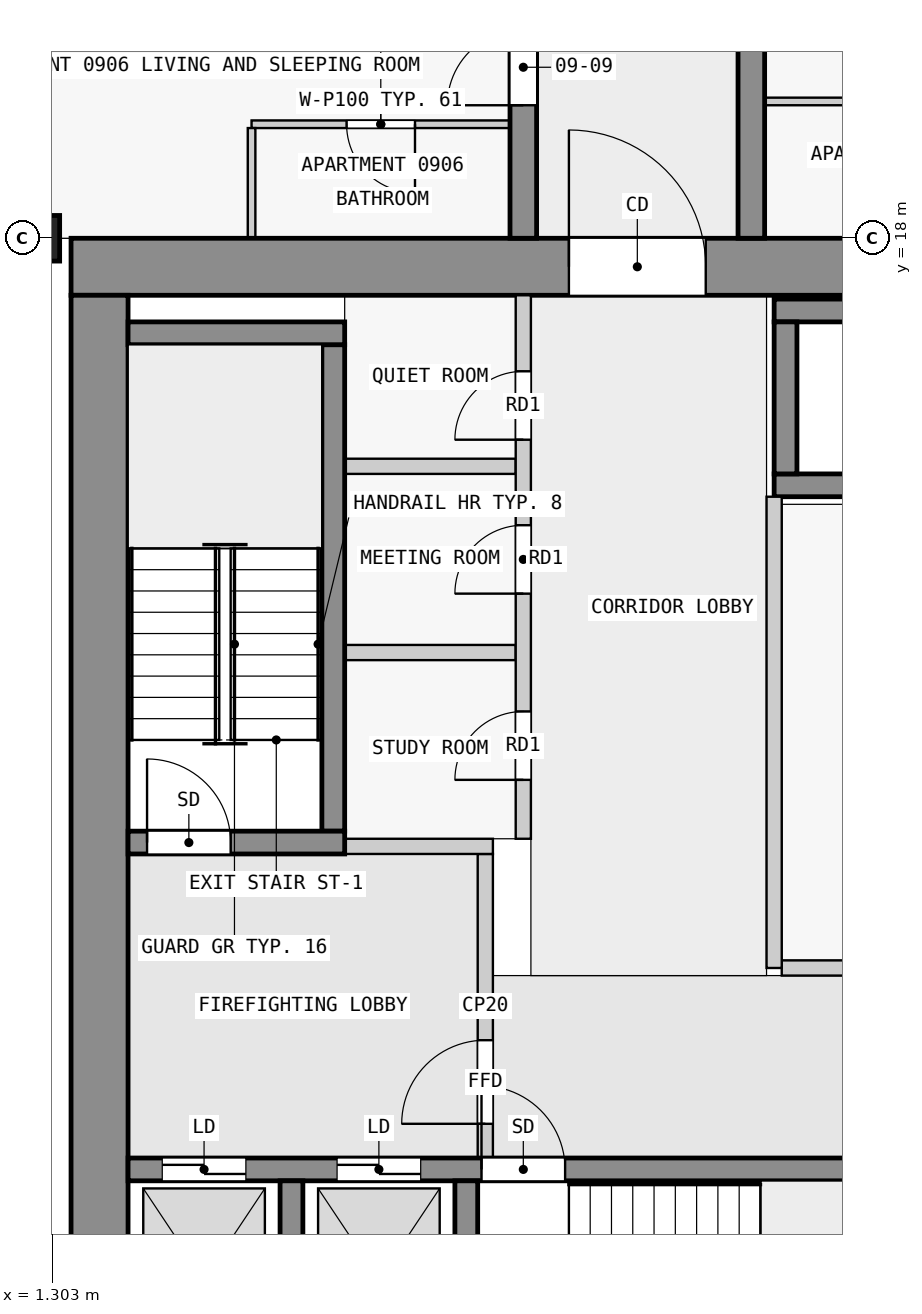
"""IFC4 building model, lengths in metres.
Left out: names, types, materials, properties, quantities, classifications, styles, units other than length and angle.
Written with IfcOpenShell. Run it as: python <this file> out.ifc"""

import sys

from ifc_helpers import new_model, si_unit, direction, frame, frame_2d, origin, origin_2d, place, context, subcontext, project, spatial, rectangle, extrude, element, fill, save


model = new_model("IFC4")
c1 = context("Model", 3, precision=1e-05, world=origin(), true_north=direction((0.0, 1.0)))
c2 = subcontext(c1, "Body", "Model", "MODEL_VIEW")
j1 = project(units=[si_unit("LENGTHUNIT", "METRE"), si_unit("PLANEANGLEUNIT", "RADIAN")], contexts=[c1])
p1 = place(None, origin())
s1 = spatial("IfcSite", under=j1, at=p1, CompositionType="ELEMENT")
p2 = place(p1, origin())
s2 = spatial("IfcBuilding", under=s1, at=p2, CompositionType="ELEMENT")
p3 = place(p2, frame((0.0, 0.0, 40.8)))
s3 = spatial("IfcBuildingStorey", under=s2, at=p3, CompositionType="ELEMENT", Elevation=40.8)
p4 = place(p3, frame((0.7, 18.0, 0.0), z_axis=(0.0, 0.0, 1.0), x_axis=(0.0, 1.0, 0.0)))
e1 = element("IfcColumn", 1, at=p4, inside=s3, PredefinedType="COLUMN", context=c2, shape_type="SweptSolid", body=[
    extrude(rectangle(XDim=0.6, YDim=1.4, at=origin_2d()), origin(), (0.0, 0.0, 1.0), 3.5),
])
p5 = place(p3, frame((1.55, 17.625, 0.0), z_axis=(0.0, 0.0, 1.0), x_axis=(1.0, 0.0, 0.0)))
e2 = element("IfcWall", 2, at=p5, inside=s3, PredefinedType="SHEAR", context=c2, shape_type="SweptSolid", body=[
    extrude(rectangle(XDim=20.95, YDim=0.75, at=frame_2d((10.475, 0.0))), origin(), (0.0, 0.0, 1.0), 3.25),
])
p6 = place(p5, frame((6.55, 0.0, 0.0)))
e3 = element("IfcOpeningElement", 3, at=p6, cuts=e2, PredefinedType="OPENING", context=c2, shape_type="SweptSolid", body=[
    extrude(rectangle(XDim=1.8, YDim=2.1, at=frame_2d((0.9, 1.05))), frame((0.0, 0.385, 0.0), z_axis=(0.0, -1.0, 0.0), x_axis=(1.0, 0.0, 0.0)), (0.0, 0.0, 1.0), 0.77),
])
p7 = place(p3, frame((1.925, 2.5, 0.0), z_axis=(0.0, 0.0, 1.0), x_axis=(0.0, 1.0, 0.0)))
e4 = element("IfcWall", 4, at=p7, inside=s3, PredefinedType="SHEAR", context=c2, shape_type="SweptSolid", body=[
    extrude(rectangle(XDim=14.75, YDim=0.75, at=frame_2d((7.375, 0.0))), origin(), (0.0, 0.0, 1.0), 3.25),
])
for number, where, z_axis, x_axis in (
    (5, (4.45, 2.8, 0.0), (0.0, 0.0, 1.0), (0.0, 1.0, 0.0)),
    (6, (6.75, 2.8, 0.0), (0.0, 0.0, 1.0), (0.0, 1.0, 0.0)),
):
    element("IfcWall", number, at=place(p3, frame(where, z_axis=z_axis, x_axis=x_axis)), inside=s3, PredefinedType="SHEAR", context=c2, shape_type="SweptSolid", body=[
        extrude(rectangle(XDim=2.8, YDim=0.3, at=frame_2d((1.4, 0.0))), origin(), (0.0, 0.0, 1.0), 3.25),
    ])
p8 = place(p3, frame((2.3, 5.75, 0.0), z_axis=(0.0, 0.0, 1.0), x_axis=(1.0, 0.0, 0.0)))
e7 = element("IfcWall", 7, at=p8, inside=s3, PredefinedType="SHEAR", context=c2, shape_type="SweptSolid", body=[
    extrude(rectangle(XDim=18.8, YDim=0.3, at=frame_2d((9.4, 0.0))), origin(), (0.0, 0.0, 1.0), 3.25),
])
p9 = place(p8, frame((4.65, 0.0, 0.0)))
e8 = element("IfcOpeningElement", 8, at=p9, cuts=e7, PredefinedType="OPENING", context=c2, shape_type="SweptSolid", body=[
    extrude(rectangle(XDim=1.1, YDim=2.1, at=frame_2d((0.55, 1.05))), frame((0.0, 0.16, 0.0), z_axis=(0.0, -1.0, 0.0), x_axis=(1.0, 0.0, 0.0)), (0.0, 0.0, 1.0), 0.32),
])
p10 = place(p8, frame((0.45, 0.0, 0.0)))
e9 = element("IfcOpeningElement", 9, at=p10, cuts=e7, PredefinedType="OPENING", context=c2, shape_type="SweptSolid", body=[
    extrude(rectangle(XDim=1.1, YDim=2.1, at=frame_2d((0.55, 1.05))), frame((0.0, 0.16, 0.0), z_axis=(0.0, -1.0, 0.0), x_axis=(1.0, 0.0, 0.0)), (0.0, 0.0, 1.0), 0.32),
])
p11 = place(p8, frame((2.75, 0.0, 0.0)))
e10 = element("IfcOpeningElement", 10, at=p11, cuts=e7, PredefinedType="OPENING", context=c2, shape_type="SweptSolid", body=[
    extrude(rectangle(XDim=1.1, YDim=2.1, at=frame_2d((0.55, 1.05))), frame((0.0, 0.16, 0.0), z_axis=(0.0, -1.0, 0.0), x_axis=(1.0, 0.0, 0.0)), (0.0, 0.0, 1.0), 0.32),
])
p12 = place(p8, frame((11.85, 0.0, 0.0)))
e11 = element("IfcOpeningElement", 11, at=p12, cuts=e7, PredefinedType="OPENING", context=c2, shape_type="SweptSolid", body=[
    extrude(rectangle(XDim=1.1, YDim=2.1, at=frame_2d((0.55, 1.05))), frame((0.0, 0.16, 0.0), z_axis=(0.0, -1.0, 0.0), x_axis=(1.0, 0.0, 0.0)), (0.0, 0.0, 1.0), 0.32),
])
p13 = place(p8, frame((14.35, 0.0, 0.0)))
e12 = element("IfcOpeningElement", 12, at=p13, cuts=e7, PredefinedType="OPENING", context=c2, shape_type="SweptSolid", body=[
    extrude(rectangle(XDim=1.1, YDim=2.1, at=frame_2d((0.55, 1.05))), frame((0.0, 0.16, 0.0), z_axis=(0.0, -1.0, 0.0), x_axis=(1.0, 0.0, 0.0)), (0.0, 0.0, 1.0), 0.32),
])
p14 = place(p8, frame((16.85, 0.0, 0.0)))
e13 = element("IfcOpeningElement", 13, at=p14, cuts=e7, PredefinedType="OPENING", context=c2, shape_type="SweptSolid", body=[
    extrude(rectangle(XDim=1.1, YDim=2.1, at=frame_2d((0.55, 1.05))), frame((0.0, 0.16, 0.0), z_axis=(0.0, -1.0, 0.0), x_axis=(1.0, 0.0, 0.0)), (0.0, 0.0, 1.0), 0.32),
])
p15 = place(p3, frame((2.3, 10.05, 0.0), z_axis=(0.0, 0.0, 1.0), x_axis=(1.0, 0.0, 0.0)))
e14 = element("IfcWall", 14, at=p15, inside=s3, PredefinedType="SHEAR", context=c2, shape_type="SweptSolid", body=[
    extrude(rectangle(XDim=2.85, YDim=0.3, at=frame_2d((1.425, 0.0))), origin(), (0.0, 0.0, 1.0), 3.25),
])
p16 = place(p15, frame((0.25, 0.0, 0.0)))
e15 = element("IfcOpeningElement", 15, at=p16, cuts=e14, PredefinedType="OPENING", context=c2, shape_type="SweptSolid", body=[
    extrude(rectangle(XDim=1.1, YDim=2.1, at=frame_2d((0.55, 1.05))), frame((0.0, 0.16, 0.0), z_axis=(0.0, -1.0, 0.0), x_axis=(1.0, 0.0, 0.0)), (0.0, 0.0, 1.0), 0.32),
])
p17 = place(p3, frame((5.0, 10.2, 0.0), z_axis=(0.0, 0.0, 1.0), x_axis=(0.0, 1.0, 0.0)))
e16 = element("IfcWall", 16, at=p17, inside=s3, PredefinedType="SHEAR", context=c2, shape_type="SweptSolid", body=[
    extrude(rectangle(XDim=6.4, YDim=0.3, at=frame_2d((3.2, 0.0))), origin(), (0.0, 0.0, 1.0), 3.25),
])
p18 = place(p3, frame((2.3, 16.75, 0.0), z_axis=(0.0, 0.0, 1.0), x_axis=(1.0, 0.0, 0.0)))
e17 = element("IfcWall", 17, at=p18, inside=s3, PredefinedType="SHEAR", context=c2, shape_type="SweptSolid", body=[
    extrude(rectangle(XDim=2.85, YDim=0.3, at=frame_2d((1.425, 0.0))), origin(), (0.0, 0.0, 1.0), 3.25),
])
for number, where, z_axis, x_axis in (
    (18, (10.8, 17.05, 0.0), (0.0, 0.0, 1.0), (1.0, 0.0, 0.0)),
    (19, (10.8, 14.75, 0.0), (0.0, 0.0, 1.0), (1.0, 0.0, 0.0)),
):
    element("IfcWall", number, at=place(p3, frame(where, z_axis=z_axis, x_axis=x_axis)), inside=s3, PredefinedType="SHEAR", context=c2, shape_type="SweptSolid", body=[
        extrude(rectangle(XDim=7.8, YDim=0.3, at=frame_2d((3.9, 0.0))), origin(), (0.0, 0.0, 1.0), 3.25),
    ])
p19 = place(p3, frame((10.95, 14.9, 0.0), z_axis=(0.0, 0.0, 1.0), x_axis=(0.0, 1.0, 0.0)))
e20 = element("IfcWall", 20, at=p19, inside=s3, PredefinedType="SHEAR", context=c2, shape_type="SweptSolid", body=[
    extrude(rectangle(XDim=2.0, YDim=0.3, at=frame_2d((1.0, 0.0))), origin(), (0.0, 0.0, 1.0), 3.25),
])
p20 = place(p3, frame((7.5, 18.0, 0.0), z_axis=(0.0, 0.0, 1.0), x_axis=(0.0, 1.0, 0.0)))
e21 = element("IfcWall", 21, at=p20, inside=s3, PredefinedType="SHEAR", context=c2, shape_type="SweptSolid", body=[
    extrude(rectangle(XDim=27.0, YDim=0.35, at=frame_2d((13.5, 0.0))), origin(), (0.0, 0.0, 1.0), 3.25),
])
p21 = place(p20, frame((1.75, 0.0, 0.0)))
e22 = element("IfcOpeningElement", 22, at=p21, cuts=e21, PredefinedType="OPENING", context=c2, shape_type="SweptSolid", body=[
    extrude(rectangle(XDim=1.0, YDim=2.1, at=frame_2d((0.5, 1.05))), frame((0.0, 0.185, 0.0), z_axis=(0.0, -1.0, 0.0), x_axis=(1.0, 0.0, 0.0)), (0.0, 0.0, 1.0), 0.37),
])
p22 = place(p20, frame((8.55, 0.0, 0.0)))
e23 = element("IfcOpeningElement", 23, at=p22, cuts=e21, PredefinedType="OPENING", context=c2, shape_type="SweptSolid", body=[
    extrude(rectangle(XDim=1.0, YDim=2.1, at=frame_2d((0.5, 1.05))), frame((0.0, 0.185, 0.0), z_axis=(0.0, -1.0, 0.0), x_axis=(1.0, 0.0, 0.0)), (0.0, 0.0, 1.0), 0.37),
])
p23 = place(p20, frame((15.25, 0.0, 0.0)))
e24 = element("IfcOpeningElement", 24, at=p23, cuts=e21, PredefinedType="OPENING", context=c2, shape_type="SweptSolid", body=[
    extrude(rectangle(XDim=1.0, YDim=2.1, at=frame_2d((0.5, 1.05))), frame((0.0, 0.185, 0.0), z_axis=(0.0, -1.0, 0.0), x_axis=(1.0, 0.0, 0.0)), (0.0, 0.0, 1.0), 0.37),
])
p24 = place(p20, frame((21.35, 0.0, 0.0)))
e25 = element("IfcOpeningElement", 25, at=p24, cuts=e21, PredefinedType="OPENING", context=c2, shape_type="SweptSolid", body=[
    extrude(rectangle(XDim=1.0, YDim=2.1, at=frame_2d((0.5, 1.05))), frame((0.0, 0.185, 0.0), z_axis=(0.0, -1.0, 0.0), x_axis=(1.0, 0.0, 0.0)), (0.0, 0.0, 1.0), 0.37),
])
p25 = place(p3, frame((10.5, 18.0, 0.0), z_axis=(0.0, 0.0, 1.0), x_axis=(0.0, 1.0, 0.0)))
e26 = element("IfcWall", 26, at=p25, inside=s3, PredefinedType="SHEAR", context=c2, shape_type="SweptSolid", body=[
    extrude(rectangle(XDim=27.0, YDim=0.35, at=frame_2d((13.5, 0.0))), origin(), (0.0, 0.0, 1.0), 3.25),
])
p26 = place(p25, frame((7.45, 0.0, 0.0)))
e27 = element("IfcOpeningElement", 27, at=p26, cuts=e26, PredefinedType="OPENING", context=c2, shape_type="SweptSolid", body=[
    extrude(rectangle(XDim=1.0, YDim=2.1, at=frame_2d((0.5, 1.05))), frame((0.0, 0.185, 0.0), z_axis=(0.0, -1.0, 0.0), x_axis=(1.0, 0.0, 0.0)), (0.0, 0.0, 1.0), 0.37),
])
p27 = place(p25, frame((19.75, 0.0, 0.0)))
e28 = element("IfcOpeningElement", 28, at=p27, cuts=e26, PredefinedType="OPENING", context=c2, shape_type="SweptSolid", body=[
    extrude(rectangle(XDim=1.0, YDim=2.1, at=frame_2d((0.5, 1.05))), frame((0.0, 0.185, 0.0), z_axis=(0.0, -1.0, 0.0), x_axis=(1.0, 0.0, 0.0)), (0.0, 0.0, 1.0), 0.37),
])
p28 = place(p25, frame((23.25, 0.0, 0.0)))
e29 = element("IfcOpeningElement", 29, at=p28, cuts=e26, PredefinedType="OPENING", context=c2, shape_type="SweptSolid", body=[
    extrude(rectangle(XDim=0.9, YDim=2.1, at=frame_2d((0.45, 1.05))), frame((0.0, 0.185, 0.0), z_axis=(0.0, -1.0, 0.0), x_axis=(1.0, 0.0, 0.0)), (0.0, 0.0, 1.0), 0.37),
])
p29 = place(p25, frame((25.45, 0.0, 0.0)))
e30 = element("IfcOpeningElement", 30, at=p29, cuts=e26, PredefinedType="OPENING", context=c2, shape_type="SweptSolid", body=[
    extrude(rectangle(XDim=1.0, YDim=2.1, at=frame_2d((0.5, 1.05))), frame((0.0, 0.185, 0.0), z_axis=(0.0, -1.0, 0.0), x_axis=(1.0, 0.0, 0.0)), (0.0, 0.0, 1.0), 0.37),
])
p30 = place(p3, frame((7.0, 5.9, 0.0), z_axis=(0.0, 0.0, 1.0), x_axis=(0.0, 1.0, 0.0)))
e31 = element("IfcWall", 31, at=p30, inside=s3, PredefinedType="PARTITIONING", context=c2, shape_type="SweptSolid", body=[
    extrude(rectangle(XDim=4.0, YDim=0.2, at=frame_2d((2.0, 0.0))), origin(), (0.0, 0.0, 1.0), 3.25),
])
p31 = place(p30, frame((0.45, 0.0, 0.0)))
e32 = element("IfcOpeningElement", 32, at=p31, cuts=e31, PredefinedType="OPENING", context=c2, shape_type="SweptSolid", body=[
    extrude(rectangle(XDim=1.1, YDim=2.1, at=frame_2d((0.55, 1.05))), frame((0.0, 0.11, 0.0), z_axis=(0.0, -1.0, 0.0), x_axis=(1.0, 0.0, 0.0)), (0.0, 0.0, 1.0), 0.22),
])
p32 = place(p3, frame((5.15, 10.0, 0.0), z_axis=(0.0, 0.0, 1.0), x_axis=(1.0, 0.0, 0.0)))
e33 = element("IfcWall", 33, at=p32, inside=s3, PredefinedType="PARTITIONING", context=c2, shape_type="SweptSolid", body=[
    extrude(rectangle(XDim=1.95, YDim=0.2, at=frame_2d((0.975, 0.0))), origin(), (0.0, 0.0, 1.0), 3.25),
])
p33 = place(p3, frame((10.8, 8.4, 0.0), z_axis=(0.0, 0.0, 1.0), x_axis=(0.0, 1.0, 0.0)))
e34 = element("IfcWall", 34, at=p33, inside=s3, PredefinedType="PARTITIONING", context=c2, shape_type="SweptSolid", body=[
    extrude(rectangle(XDim=6.2, YDim=0.2, at=frame_2d((3.1, 0.0))), origin(), (0.0, 0.0, 1.0), 3.25),
])
p34 = place(p3, frame((10.9, 8.4, 0.0), z_axis=(0.0, 0.0, 1.0), x_axis=(1.0, 0.0, 0.0)))
e35 = element("IfcWall", 35, at=p34, inside=s3, PredefinedType="PARTITIONING", context=c2, shape_type="SweptSolid", body=[
    extrude(rectangle(XDim=7.4, YDim=0.2, at=frame_2d((3.7, 0.0))), origin(), (0.0, 0.0, 1.0), 3.25),
])
p35 = place(p3, frame((7.5, 10.1, 0.0), z_axis=(0.0, 0.0, 1.0), x_axis=(0.0, 1.0, 0.0)))
e36 = element("IfcWall", 36, at=p35, inside=s3, PredefinedType="PARTITIONING", context=c2, shape_type="SweptSolid", body=[
    extrude(rectangle(XDim=7.15, YDim=0.2, at=frame_2d((3.575, 0.0))), origin(), (0.0, 0.0, 1.0), 3.25),
])
p36 = place(p35, frame((0.775, 0.0, 0.0)))
e37 = element("IfcOpeningElement", 37, at=p36, cuts=e36, PredefinedType="OPENING", context=c2, shape_type="SweptSolid", body=[
    extrude(rectangle(XDim=0.9, YDim=2.1, at=frame_2d((0.45, 1.05))), frame((0.0, 0.11, 0.0), z_axis=(0.0, -1.0, 0.0), x_axis=(1.0, 0.0, 0.0)), (0.0, 0.0, 1.0), 0.22),
])
p37 = place(p35, frame((3.225, 0.0, 0.0)))
e38 = element("IfcOpeningElement", 38, at=p37, cuts=e36, PredefinedType="OPENING", context=c2, shape_type="SweptSolid", body=[
    extrude(rectangle(XDim=0.9, YDim=2.1, at=frame_2d((0.45, 1.05))), frame((0.0, 0.11, 0.0), z_axis=(0.0, -1.0, 0.0), x_axis=(1.0, 0.0, 0.0)), (0.0, 0.0, 1.0), 0.22),
])
p38 = place(p35, frame((5.25, 0.0, 0.0)))
e39 = element("IfcOpeningElement", 39, at=p38, cuts=e36, PredefinedType="OPENING", context=c2, shape_type="SweptSolid", body=[
    extrude(rectangle(XDim=0.9, YDim=2.1, at=frame_2d((0.45, 1.05))), frame((0.0, 0.11, 0.0), z_axis=(0.0, -1.0, 0.0), x_axis=(1.0, 0.0, 0.0)), (0.0, 0.0, 1.0), 0.22),
])
for number, where, z_axis, x_axis in (
    (40, (5.15, 12.55, 0.0), (0.0, 0.0, 1.0), (1.0, 0.0, 0.0)),
    (41, (5.15, 15.0, 0.0), (0.0, 0.0, 1.0), (1.0, 0.0, 0.0)),
):
    element("IfcWall", number, at=place(p3, frame(where, z_axis=z_axis, x_axis=x_axis)), inside=s3, PredefinedType="PARTITIONING", context=c2, shape_type="SweptSolid", body=[
        extrude(rectangle(XDim=2.25, YDim=0.2, at=frame_2d((1.125, 0.0))), origin(), (0.0, 0.0, 1.0), 3.25),
    ])
p39 = place(p3, frame((7.325, 19.5, 0.0), z_axis=(0.0, 0.0, 1.0), x_axis=(-1.0, 0.0, 0.0)))
e42 = element("IfcWall", 42, at=p39, inside=s3, PredefinedType="PARTITIONING", context=c2, shape_type="SweptSolid", body=[
    extrude(rectangle(XDim=3.4, YDim=0.1, at=frame_2d((1.7, 0.0))), origin(), (0.0, 0.0, 1.0), 3.25),
])
p40 = place(p39, frame((1.25, 0.0, 0.0)))
e43 = element("IfcOpeningElement", 43, at=p40, cuts=e42, PredefinedType="OPENING", context=c2, shape_type="SweptSolid", body=[
    extrude(rectangle(XDim=0.9, YDim=2.1, at=frame_2d((0.45, 1.05))), frame((0.0, 0.06, 0.0), z_axis=(0.0, -1.0, 0.0), x_axis=(1.0, 0.0, 0.0)), (0.0, 0.0, 1.0), 0.12),
])
p41 = place(p3, frame((14.025, 19.8, 0.0), z_axis=(0.0, 0.0, 1.0), x_axis=(-1.0, 0.0, 0.0)))
e44 = element("IfcWall", 44, at=p41, inside=s3, PredefinedType="PARTITIONING", context=c2, shape_type="SweptSolid", body=[
    extrude(rectangle(XDim=3.35, YDim=0.1, at=frame_2d((1.675, 0.0))), origin(), (0.0, 0.0, 1.0), 3.25),
])
p42 = place(p41, frame((1.25, 0.0, 0.0)))
e45 = element("IfcOpeningElement", 45, at=p42, cuts=e44, PredefinedType="OPENING", context=c2, shape_type="SweptSolid", body=[
    extrude(rectangle(XDim=0.9, YDim=2.1, at=frame_2d((0.45, 1.05))), frame((0.0, 0.06, 0.0), z_axis=(0.0, -1.0, 0.0), x_axis=(1.0, 0.0, 0.0)), (0.0, 0.0, 1.0), 0.12),
])
p43 = place(p3, frame((3.925, 19.45, 0.0), z_axis=(0.0, 0.0, 1.0), x_axis=(0.0, -1.0, 0.0)))
e46 = element("IfcWall", 46, at=p43, inside=s3, PredefinedType="PARTITIONING", context=c2, shape_type="SweptSolid", body=[
    extrude(rectangle(XDim=1.45, YDim=0.1, at=frame_2d((0.725, 0.0))), origin(), (0.0, 0.0, 1.0), 3.25),
])
p44 = place(p31, origin())
e47 = element("IfcDoor", 47, at=p44, inside=s3, OperationType="SINGLE_SWING_LEFT", PredefinedType="DOOR", context=c2, shape_type="SweptSolid", body=[
    extrude(rectangle(XDim=1.1, YDim=2.1, at=frame_2d((0.55, 1.05))), frame((0.0, 0.025, 0.0), z_axis=(0.0, -1.0, 0.0), x_axis=(1.0, 0.0, 0.0)), (0.0, 0.0, 1.0), 0.05),
])
fill(e32, e47)
p45 = place(p16, origin())
e48 = element("IfcDoor", 48, at=p45, inside=s3, OperationType="SINGLE_SWING_RIGHT", PredefinedType="DOOR", context=c2, shape_type="SweptSolid", body=[
    extrude(rectangle(XDim=1.1, YDim=2.1, at=frame_2d((0.55, 1.05))), frame((0.0, 0.025, 0.0), z_axis=(0.0, -1.0, 0.0), x_axis=(1.0, 0.0, 0.0)), (0.0, 0.0, 1.0), 0.05),
])
fill(e15, e48)
p46 = place(p9, origin())
e49 = element("IfcDoor", 49, at=p46, inside=s3, OperationType="SINGLE_SWING_LEFT", PredefinedType="DOOR", context=c2, shape_type="SweptSolid", body=[
    extrude(rectangle(XDim=1.1, YDim=2.1, at=frame_2d((0.55, 1.05))), frame((0.0, 0.025, 0.0), z_axis=(0.0, -1.0, 0.0), x_axis=(1.0, 0.0, 0.0)), (0.0, 0.0, 1.0), 0.05),
])
fill(e8, e49)
p47 = place(p10, origin())
e50 = element("IfcDoor", 50, at=p47, inside=s3, OperationType="DOUBLE_DOOR_SLIDING", PredefinedType="DOOR", context=c2, shape_type="SweptSolid", body=[
    extrude(rectangle(XDim=1.1, YDim=2.1, at=frame_2d((0.55, 1.05))), frame((0.0, 0.025, 0.0), z_axis=(0.0, -1.0, 0.0), x_axis=(1.0, 0.0, 0.0)), (0.0, 0.0, 1.0), 0.05),
])
fill(e9, e50)
p48 = place(p11, origin())
e51 = element("IfcDoor", 51, at=p48, inside=s3, OperationType="DOUBLE_DOOR_SLIDING", PredefinedType="DOOR", context=c2, shape_type="SweptSolid", body=[
    extrude(rectangle(XDim=1.1, YDim=2.1, at=frame_2d((0.55, 1.05))), frame((0.0, 0.025, 0.0), z_axis=(0.0, -1.0, 0.0), x_axis=(1.0, 0.0, 0.0)), (0.0, 0.0, 1.0), 0.05),
])
fill(e10, e51)
p49 = place(p6, origin())
e52 = element("IfcDoor", 52, at=p49, inside=s3, OperationType="DOUBLE_DOOR_SINGLE_SWING", PredefinedType="DOOR", context=c2, shape_type="SweptSolid", body=[
    extrude(rectangle(XDim=1.8, YDim=2.1, at=frame_2d((0.9, 1.05))), frame((0.0, 0.025, 0.0), z_axis=(0.0, -1.0, 0.0), x_axis=(1.0, 0.0, 0.0)), (0.0, 0.0, 1.0), 0.05),
])
fill(e3, e52)
p50 = place(p36, origin())
e53 = element("IfcDoor", 53, at=p50, inside=s3, OperationType="SINGLE_SWING_RIGHT", PredefinedType="DOOR", context=c2, shape_type="SweptSolid", body=[
    extrude(rectangle(XDim=0.9, YDim=2.1, at=frame_2d((0.45, 1.05))), frame((0.0, 0.025, 0.0), z_axis=(0.0, -1.0, 0.0), x_axis=(1.0, 0.0, 0.0)), (0.0, 0.0, 1.0), 0.05),
])
fill(e37, e53)
p51 = place(p37, origin())
e54 = element("IfcDoor", 54, at=p51, inside=s3, OperationType="SINGLE_SWING_RIGHT", PredefinedType="DOOR", context=c2, shape_type="SweptSolid", body=[
    extrude(rectangle(XDim=0.9, YDim=2.1, at=frame_2d((0.45, 1.05))), frame((0.0, 0.025, 0.0), z_axis=(0.0, -1.0, 0.0), x_axis=(1.0, 0.0, 0.0)), (0.0, 0.0, 1.0), 0.05),
])
fill(e38, e54)
p52 = place(p38, origin())
e55 = element("IfcDoor", 55, at=p52, inside=s3, OperationType="SINGLE_SWING_RIGHT", PredefinedType="DOOR", context=c2, shape_type="SweptSolid", body=[
    extrude(rectangle(XDim=0.9, YDim=2.1, at=frame_2d((0.45, 1.05))), frame((0.0, 0.025, 0.0), z_axis=(0.0, -1.0, 0.0), x_axis=(1.0, 0.0, 0.0)), (0.0, 0.0, 1.0), 0.05),
])
fill(e39, e55)
p53 = place(p21, origin())
e56 = element("IfcDoor", 56, at=p53, inside=s3, OperationType="SINGLE_SWING_LEFT", PredefinedType="DOOR", context=c2, shape_type="SweptSolid", body=[
    extrude(rectangle(XDim=1.0, YDim=2.1, at=frame_2d((0.5, 1.05))), frame((0.0, 0.025, 0.0), z_axis=(0.0, -1.0, 0.0), x_axis=(1.0, 0.0, 0.0)), (0.0, 0.0, 1.0), 0.05),
])
fill(e22, e56)
p54 = place(p40, origin())
e57 = element("IfcDoor", 57, at=p54, inside=s3, OperationType="SINGLE_SWING_LEFT", PredefinedType="DOOR", context=c2, shape_type="SweptSolid", body=[
    extrude(rectangle(XDim=0.9, YDim=2.1, at=frame_2d((0.45, 1.05))), frame((0.0, 0.025, 0.0), z_axis=(0.0, -1.0, 0.0), x_axis=(1.0, 0.0, 0.0)), (0.0, 0.0, 1.0), 0.05),
])
fill(e43, e57)
save(model, sys.argv[1])
